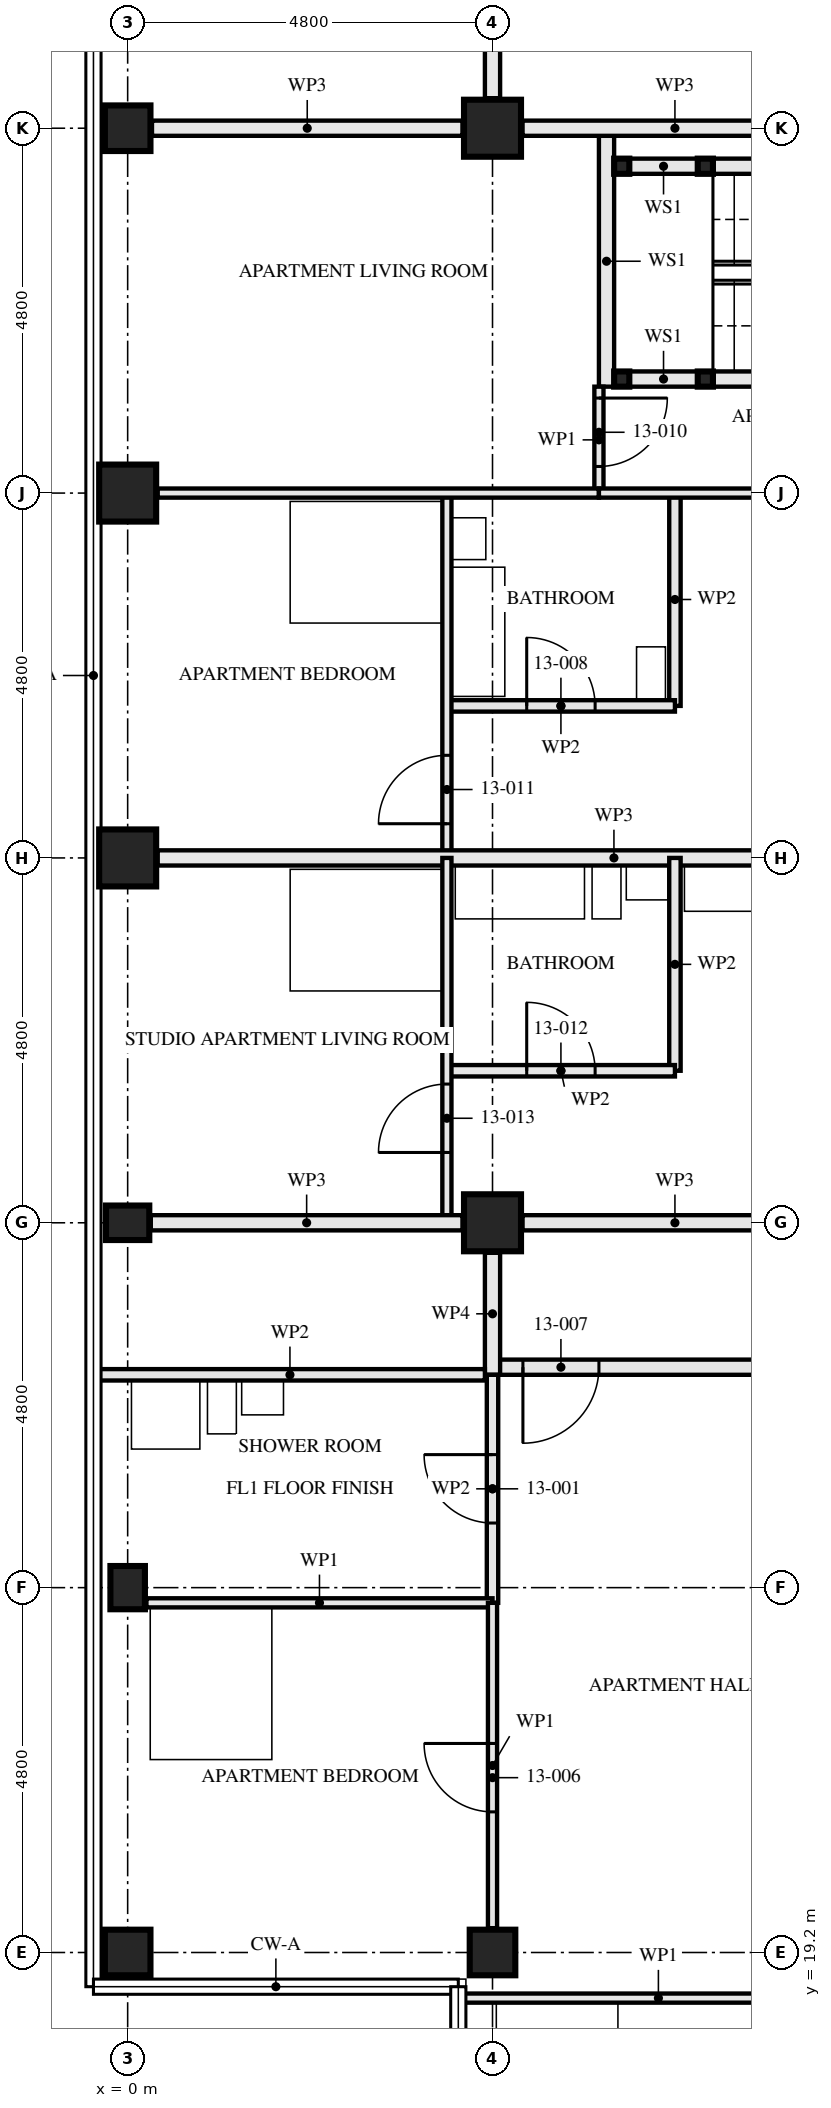
"""IFC4 building model, lengths in metres.
Left out: names, types, materials, properties, quantities, classifications, styles, units other than length and angle.
Written with IfcOpenShell. Run it as: python <this file> out.ifc"""

import sys

from ifc_helpers import new_model, si_unit, direction, frame, frame_2d, origin, origin_2d, place, context, subcontext, project, spatial, rectangle, hollow_rectangle, i_section, extrude, element, fill, save


model = new_model("IFC4")
c1 = context("Model", 3, precision=1e-05, world=origin(), true_north=direction((0.0, 1.0)))
c2 = subcontext(c1, "Body", "Model", "MODEL_VIEW")
j1 = project(units=[si_unit("LENGTHUNIT", "METRE"), si_unit("PLANEANGLEUNIT", "RADIAN")], contexts=[c1])
p1 = place(None, origin())
s1 = spatial("IfcSite", under=j1, at=p1, CompositionType="ELEMENT")
p2 = place(p1, origin())
s2 = spatial("IfcBuilding", under=s1, at=p2, CompositionType="ELEMENT")
p3 = place(p2, frame((0.0, 0.0, 51.5)))
s3 = spatial("IfcBuildingStorey", under=s2, at=p3, CompositionType="ELEMENT", Elevation=51.5)
p4 = place(p3, frame((0.0, 19.2, 0.0), z_axis=(0.0, 0.0, 1.0), x_axis=(0.0, 1.0, 0.0)))
e1 = element("IfcColumn", 1, at=p4, inside=s3, PredefinedType="COLUMN", context=c2, shape_type="SweptSolid", body=[
    extrude(hollow_rectangle(XDim=0.6, YDim=0.6, WallThickness=0.05, at=origin_2d()), origin(), (0.0, 0.0, 1.0), 3.5),
])
for number, where, z_axis, x_axis in (
    (2, (0.0, 24.0, 0.0), (0.0, 0.0, 1.0), (1.0, 0.0, 0.0)),
    (3, (0.0, 28.8, 0.0), (0.0, 0.0, 1.0), (0.0, 1.0, 0.0)),
):
    element("IfcColumn", number, at=place(p3, frame(where, z_axis=z_axis, x_axis=x_axis)), inside=s3, PredefinedType="COLUMN", context=c2, shape_type="SweptSolid", body=[
        extrude(i_section(OverallWidth=0.454, OverallDepth=0.569, WebThickness=0.078, FlangeThickness=0.125, FilletRadius=0.015, at=origin_2d()), origin(), (0.0, 0.0, 1.0), 3.5),
    ])
for number, where, z_axis, x_axis in (
    (4, (0.0, 33.6, 0.0), (0.0, 0.0, 1.0), (1.0, 0.0, 0.0)),
    (5, (0.0, 38.4, 0.0), (0.0, 0.0, 1.0), (1.0, 0.0, 0.0)),
):
    element("IfcColumn", number, at=place(p3, frame(where, z_axis=z_axis, x_axis=x_axis)), inside=s3, PredefinedType="COLUMN", context=c2, shape_type="SweptSolid", body=[
        extrude(hollow_rectangle(XDim=0.75, YDim=0.75, WallThickness=0.08, at=origin_2d()), origin(), (0.0, 0.0, 1.0), 3.5),
    ])
p5 = place(p3, frame((0.0, 43.2, 0.0), z_axis=(0.0, 0.0, 1.0), x_axis=(0.0, 1.0, 0.0)))
e6 = element("IfcColumn", 6, at=p5, inside=s3, PredefinedType="COLUMN", context=c2, shape_type="SweptSolid", body=[
    extrude(hollow_rectangle(XDim=0.6, YDim=0.6, WallThickness=0.08, at=origin_2d()), origin(), (0.0, 0.0, 1.0), 3.5),
])
p6 = place(p3, frame((4.8, 19.2, 0.0), z_axis=(0.0, 0.0, 1.0), x_axis=(0.0, 1.0, 0.0)))
e7 = element("IfcColumn", 7, at=p6, inside=s3, PredefinedType="COLUMN", context=c2, shape_type="SweptSolid", body=[
    extrude(hollow_rectangle(XDim=0.6, YDim=0.6, WallThickness=0.05, at=origin_2d()), origin(), (0.0, 0.0, 1.0), 3.5),
])
for number, where, z_axis, x_axis in (
    (8, (4.8, 28.8, 0.0), (0.0, 0.0, 1.0), (0.0, 1.0, 0.0)),
    (9, (4.8, 43.2, 0.0), (0.0, 0.0, 1.0), (0.0, 1.0, 0.0)),
):
    element("IfcColumn", number, at=place(p3, frame(where, z_axis=z_axis, x_axis=x_axis)), inside=s3, PredefinedType="COLUMN", context=c2, shape_type="SweptSolid", body=[
        extrude(hollow_rectangle(XDim=0.75, YDim=0.75, WallThickness=0.08, at=origin_2d()), origin(), (0.0, 0.0, 1.0), 3.5),
    ])
for number, where, z_axis, x_axis in (
    (10, (6.5, 42.7, 0.0), (0.0, 0.0, 1.0), (1.0, 0.0, 0.0)),
    (11, (6.5, 39.9, 0.0), (0.0, 0.0, 1.0), (1.0, 0.0, 0.0)),
    (12, (7.6, 42.7, 0.0), (0.0, 0.0, 1.0), (1.0, 0.0, 0.0)),
    (13, (7.6, 39.9, 0.0), (0.0, 0.0, 1.0), (1.0, 0.0, 0.0)),
):
    element("IfcColumn", number, at=place(p3, frame(where, z_axis=z_axis, x_axis=x_axis)), inside=s3, PredefinedType="COLUMN", context=c2, shape_type="SweptSolid", body=[
        extrude(hollow_rectangle(XDim=0.2, YDim=0.2, WallThickness=0.008, at=origin_2d()), origin(), (0.0, 0.0, 1.0), 3.33),
    ])
p7 = place(p3, frame((4.8, 23.8, 0.0), z_axis=(0.0, 0.0, 1.0), x_axis=(0.0, 1.0, 0.0)))
e14 = element("IfcWall", 14, at=p7, inside=s3, PredefinedType="PARTITIONING", context=c2, shape_type="SweptSolid", body=[
    extrude(rectangle(XDim=3.0, YDim=0.15, at=frame_2d((1.5, 0.0))), origin(), (0.0, 0.0, 1.0), 2.55),
])
p8 = place(p7, frame((1.05, 0.0, 0.0)))
e15 = element("IfcOpeningElement", 15, at=p8, cuts=e14, PredefinedType="OPENING", context=c2, shape_type="SweptSolid", body=[
    extrude(rectangle(XDim=0.9, YDim=2.1, at=frame_2d((0.45, 1.05))), frame((0.0, 0.085, 0.0), z_axis=(0.0, -1.0, 0.0), x_axis=(1.0, 0.0, 0.0)), (0.0, 0.0, 1.0), 0.171),
])
p9 = place(p3, frame((0.247, 23.8, 0.0), z_axis=(0.0, 0.0, 1.0), x_axis=(1.0, 0.0, 0.0)))
e16 = element("IfcWall", 16, at=p9, inside=s3, PredefinedType="PARTITIONING", context=c2, shape_type="SweptSolid", body=[
    extrude(rectangle(XDim=4.553, YDim=0.12, at=frame_2d((2.276, 0.0))), origin(), (0.0, 0.0, 1.0), 3.33),
])
p10 = place(p3, frame((4.365, 18.6, 0.0), z_axis=(0.0, 0.0, 1.0), x_axis=(1.0, 0.0, 0.0)))
e17 = element("IfcWall", 17, at=p10, inside=s3, PredefinedType="PARTITIONING", context=c2, shape_type="SweptSolid", body=[
    extrude(rectangle(XDim=5.235, YDim=0.12, at=frame_2d((2.618, 0.0))), origin(), (0.0, 0.0, 1.0), 2.32),
])
p11 = place(p10, frame((3.885, 0.0, 0.0)))
e18 = element("IfcOpeningElement", 18, at=p11, cuts=e17, PredefinedType="OPENING", context=c2, shape_type="SweptSolid", body=[
    extrude(rectangle(XDim=0.9, YDim=2.1, at=frame_2d((0.45, 1.05))), frame((0.0, 0.071, 0.0), z_axis=(0.0, -1.0, 0.0), x_axis=(1.0, 0.0, 0.0)), (0.0, 0.0, 1.0), 0.141),
])
p12 = place(p3, frame((4.8, 19.52, 0.0), z_axis=(0.0, 0.0, 1.0), x_axis=(0.0, 1.0, 0.0)))
e19 = element("IfcWall", 19, at=p12, inside=s3, PredefinedType="PARTITIONING", context=c2, shape_type="SweptSolid", body=[
    extrude(rectangle(XDim=4.28, YDim=0.12, at=frame_2d((2.14, 0.0))), origin(), (0.0, 0.0, 1.0), 3.33),
])
p13 = place(p12, frame((1.53, 0.0, 0.0)))
e20 = element("IfcOpeningElement", 20, at=p13, cuts=e19, PredefinedType="OPENING", context=c2, shape_type="SweptSolid", body=[
    extrude(rectangle(XDim=0.9, YDim=2.1, at=frame_2d((0.45, 1.05))), frame((0.0, 0.071, 0.0), z_axis=(0.0, -1.0, 0.0), x_axis=(1.0, 0.0, 0.0)), (0.0, 0.0, 1.0), 0.141),
])
p14 = place(p3, frame((4.8, 26.9, 0.0), z_axis=(0.0, 0.0, 1.0), x_axis=(1.0, 0.0, 0.0)))
e21 = element("IfcWall", 21, at=p14, inside=s3, PredefinedType="PARTITIONING", context=c2, shape_type="SweptSolid", body=[
    extrude(rectangle(XDim=9.6, YDim=0.2, at=frame_2d((4.8, 0.0))), origin(), (0.0, 0.0, 1.0), 3.33),
])
p15 = place(p14, frame((0.4, 0.0, 0.0)))
e22 = element("IfcOpeningElement", 22, at=p15, cuts=e21, PredefinedType="OPENING", context=c2, shape_type="SweptSolid", body=[
    extrude(rectangle(XDim=1.0, YDim=2.1, at=frame_2d((0.5, 1.05))), frame((0.0, 0.111, 0.0), z_axis=(0.0, -1.0, 0.0), x_axis=(1.0, 0.0, 0.0)), (0.0, 0.0, 1.0), 0.221),
])
p16 = place(p3, frame((4.8, 26.8, 0.0), z_axis=(0.0, 0.0, 1.0), x_axis=(0.0, 1.0, 0.0)))
e23 = element("IfcWall", 23, at=p16, inside=s3, PredefinedType="PARTITIONING", context=c2, shape_type="SweptSolid", body=[
    extrude(rectangle(XDim=1.605, YDim=0.2, at=frame_2d((0.802, 0.0))), origin(), (0.0, 0.0, 1.0), 3.33),
])
p17 = place(p3, frame((6.6, 42.7, 0.0), z_axis=(0.0, 0.0, 1.0), x_axis=(1.0, 0.0, 0.0)))
e24 = element("IfcWall", 24, at=p17, inside=s3, PredefinedType="SOLIDWALL", context=c2, shape_type="SweptSolid", body=[
    extrude(rectangle(XDim=0.9, YDim=0.2, at=frame_2d((0.45, 0.0))), origin(), (0.0, 0.0, 1.0), 2.99),
])
p18 = place(p3, frame((7.7, 42.7, 0.0), z_axis=(0.0, 0.0, 1.0), x_axis=(1.0, 0.0, 0.0)))
e25 = element("IfcWall", 25, at=p18, inside=s3, PredefinedType="SOLIDWALL", context=c2, shape_type="SweptSolid", body=[
    extrude(rectangle(XDim=4.7, YDim=0.2, at=frame_2d((2.35, 0.0))), origin(), (0.0, 0.0, 1.0), 2.99),
])
p19 = place(p3, frame((6.6, 39.9, 0.0), z_axis=(0.0, 0.0, 1.0), x_axis=(1.0, 0.0, 0.0)))
e26 = element("IfcWall", 26, at=p19, inside=s3, PredefinedType="SOLIDWALL", context=c2, shape_type="SweptSolid", body=[
    extrude(rectangle(XDim=0.9, YDim=0.2, at=frame_2d((0.45, 0.0))), origin(), (0.0, 0.0, 1.0), 2.99),
])
p20 = place(p3, frame((7.7, 39.9, 0.0), z_axis=(0.0, 0.0, 1.0), x_axis=(1.0, 0.0, 0.0)))
e27 = element("IfcWall", 27, at=p20, inside=s3, PredefinedType="SOLIDWALL", context=c2, shape_type="SweptSolid", body=[
    extrude(rectangle(XDim=4.7, YDim=0.2, at=frame_2d((2.35, 0.0))), origin(), (0.0, 0.0, 1.0), 2.99),
])
p21 = place(p3, frame((6.3, 43.1, 0.0), z_axis=(0.0, 0.0, 1.0), x_axis=(0.0, -1.0, 0.0)))
e28 = element("IfcWall", 28, at=p21, inside=s3, PredefinedType="SOLIDWALL", context=c2, shape_type="SweptSolid", body=[
    extrude(rectangle(XDim=3.3, YDim=0.2, at=frame_2d((1.65, 0.0))), origin(), (0.0, 0.0, 1.0), 3.33),
])
p22 = place(p3, frame((4.2, 35.6, 0.0), z_axis=(0.0, 0.0, 1.0), x_axis=(1.0, 0.0, 0.0)))
e29 = element("IfcWall", 29, at=p22, inside=s3, PredefinedType="PARTITIONING", context=c2, shape_type="SweptSolid", body=[
    extrude(rectangle(XDim=3.0, YDim=0.15, at=frame_2d((1.5, 0.0))), origin(), (0.0, 0.0, 1.0), 3.33),
])
p23 = place(p22, frame((1.05, 0.0, 0.0)))
e30 = element("IfcOpeningElement", 30, at=p23, cuts=e29, PredefinedType="OPENING", context=c2, shape_type="SweptSolid", body=[
    extrude(rectangle(XDim=0.9, YDim=2.1, at=frame_2d((0.45, 1.05))), frame((0.0, 0.085, 0.0), z_axis=(0.0, -1.0, 0.0), x_axis=(1.0, 0.0, 0.0)), (0.0, 0.0, 1.0), 0.171),
])
p24 = place(p3, frame((7.2, 38.4, 0.0), z_axis=(0.0, 0.0, 1.0), x_axis=(0.0, -1.0, 0.0)))
e31 = element("IfcWall", 31, at=p24, inside=s3, PredefinedType="PARTITIONING", context=c2, shape_type="SweptSolid", body=[
    extrude(rectangle(XDim=2.8, YDim=0.15, at=frame_2d((1.4, 0.0))), origin(), (0.0, 0.0, 1.0), 3.33),
])
p25 = place(p3, frame((6.2, 38.4, 0.0), z_axis=(0.0, 0.0, 1.0), x_axis=(1.0, 0.0, 0.0)))
e32 = element("IfcWall", 32, at=p25, inside=s3, PredefinedType="PARTITIONING", context=c2, shape_type="SweptSolid", body=[
    extrude(rectangle(XDim=6.25, YDim=0.12, at=frame_2d((3.125, 0.0))), origin(), (0.0, 0.0, 1.0), 2.55),
])
p26 = place(p25, frame((3.15, 0.0, 0.0)))
e33 = element("IfcOpeningElement", 33, at=p26, cuts=e32, PredefinedType="OPENING", context=c2, shape_type="SweptSolid", body=[
    extrude(rectangle(XDim=0.9, YDim=2.1, at=frame_2d((0.45, 1.05))), frame((0.0, 0.071, 0.0), z_axis=(0.0, -1.0, 0.0), x_axis=(1.0, 0.0, 0.0)), (0.0, 0.0, 1.0), 0.141),
])
p27 = place(p3, frame((6.2, 39.8, 0.0), z_axis=(0.0, 0.0, 1.0), x_axis=(0.0, -1.0, 0.0)))
e34 = element("IfcWall", 34, at=p27, inside=s3, PredefinedType="PARTITIONING", context=c2, shape_type="SweptSolid", body=[
    extrude(rectangle(XDim=1.4, YDim=0.12, at=frame_2d((0.7, 0.0))), origin(), (0.0, 0.0, 1.0), 3.33),
])
p28 = place(p27, frame((0.15, 0.0, 0.0)))
e35 = element("IfcOpeningElement", 35, at=p28, cuts=e34, PredefinedType="OPENING", context=c2, shape_type="SweptSolid", body=[
    extrude(rectangle(XDim=0.9, YDim=2.1, at=frame_2d((0.45, 1.05))), frame((0.0, 0.071, 0.0), z_axis=(0.0, -1.0, 0.0), x_axis=(1.0, 0.0, 0.0)), (0.0, 0.0, 1.0), 0.141),
])
p29 = place(p3, frame((4.2, 38.4, 0.0), z_axis=(0.0, 0.0, 1.0), x_axis=(0.0, -1.0, 0.0)))
e36 = element("IfcWall", 36, at=p29, inside=s3, PredefinedType="PARTITIONING", context=c2, shape_type="SweptSolid", body=[
    extrude(rectangle(XDim=4.8, YDim=0.12, at=frame_2d((2.4, 0.0))), origin(), (0.0, 0.0, 1.0), 3.33),
])
p30 = place(p29, frame((3.45, 0.0, 0.0)))
e37 = element("IfcOpeningElement", 37, at=p30, cuts=e36, PredefinedType="OPENING", context=c2, shape_type="SweptSolid", body=[
    extrude(rectangle(XDim=0.9, YDim=2.1, at=frame_2d((0.45, 1.05))), frame((0.0, 0.071, 0.0), z_axis=(0.0, -1.0, 0.0), x_axis=(1.0, 0.0, 0.0)), (0.0, 0.0, 1.0), 0.141),
])
p31 = place(p3, frame((0.395, 38.4, 0.0), z_axis=(0.0, 0.0, 1.0), x_axis=(1.0, 0.0, 0.0)))
e38 = element("IfcWall", 38, at=p31, inside=s3, PredefinedType="PARTITIONING", context=c2, shape_type="SweptSolid", body=[
    extrude(rectangle(XDim=5.805, YDim=0.12, at=frame_2d((2.902, 0.0))), origin(), (0.0, 0.0, 1.0), 2.55),
])
p32 = place(p3, frame((0.395, 33.6, 0.0), z_axis=(0.0, 0.0, 1.0), x_axis=(1.0, 0.0, 0.0)))
e39 = element("IfcWall", 39, at=p32, inside=s3, PredefinedType="PARTITIONING", context=c2, shape_type="SweptSolid", body=[
    extrude(rectangle(XDim=12.005, YDim=0.2, at=frame_2d((6.002, 0.0))), origin(), (0.0, 0.0, 1.0), 2.55),
])
p33 = place(p3, frame((4.2, 30.8, 0.0), z_axis=(0.0, 0.0, 1.0), x_axis=(1.0, 0.0, 0.0)))
e40 = element("IfcWall", 40, at=p33, inside=s3, PredefinedType="PARTITIONING", context=c2, shape_type="SweptSolid", body=[
    extrude(rectangle(XDim=3.0, YDim=0.15, at=frame_2d((1.5, 0.0))), origin(), (0.0, 0.0, 1.0), 3.33),
])
p34 = place(p33, frame((1.05, 0.0, 0.0)))
e41 = element("IfcOpeningElement", 41, at=p34, cuts=e40, PredefinedType="OPENING", context=c2, shape_type="SweptSolid", body=[
    extrude(rectangle(XDim=0.9, YDim=2.1, at=frame_2d((0.45, 1.05))), frame((0.0, 0.085, 0.0), z_axis=(0.0, -1.0, 0.0), x_axis=(1.0, 0.0, 0.0)), (0.0, 0.0, 1.0), 0.171),
])
p35 = place(p3, frame((7.2, 33.6, 0.0), z_axis=(0.0, 0.0, 1.0), x_axis=(0.0, -1.0, 0.0)))
e42 = element("IfcWall", 42, at=p35, inside=s3, PredefinedType="PARTITIONING", context=c2, shape_type="SweptSolid", body=[
    extrude(rectangle(XDim=2.8, YDim=0.15, at=frame_2d((1.4, 0.0))), origin(), (0.0, 0.0, 1.0), 3.33),
])
p36 = place(p3, frame((4.2, 33.6, 0.0), z_axis=(0.0, 0.0, 1.0), x_axis=(0.0, -1.0, 0.0)))
e43 = element("IfcWall", 43, at=p36, inside=s3, PredefinedType="PARTITIONING", context=c2, shape_type="SweptSolid", body=[
    extrude(rectangle(XDim=4.8, YDim=0.12, at=frame_2d((2.4, 0.0))), origin(), (0.0, 0.0, 1.0), 3.33),
])
p37 = place(p36, frame((2.975, 0.0, 0.0)))
e44 = element("IfcOpeningElement", 44, at=p37, cuts=e43, PredefinedType="OPENING", context=c2, shape_type="SweptSolid", body=[
    extrude(rectangle(XDim=0.9, YDim=2.1, at=frame_2d((0.45, 1.05))), frame((0.0, 0.071, 0.0), z_axis=(0.0, -1.0, 0.0), x_axis=(1.0, 0.0, 0.0)), (0.0, 0.0, 1.0), 0.141),
])
p38 = place(p3, frame((4.8, 45.2, 0.0), z_axis=(0.0, 0.0, 1.0), x_axis=(0.0, -1.0, 0.0)))
e45 = element("IfcWall", 45, at=p38, inside=s3, PredefinedType="PARTITIONING", context=c2, shape_type="SweptSolid", body=[
    extrude(rectangle(XDim=1.605, YDim=0.2, at=frame_2d((0.802, 0.0))), origin(), (0.0, 0.0, 1.0), 3.33),
])
p39 = place(p3, frame((9.205, 28.8, 0.0), z_axis=(0.0, 0.0, 1.0), x_axis=(-1.0, 0.0, 0.0)))
e46 = element("IfcWall", 46, at=p39, inside=s3, PredefinedType="PARTITIONING", context=c2, shape_type="SweptSolid", body=[
    extrude(rectangle(XDim=4.01, YDim=0.2, at=frame_2d((2.005, 0.0))), origin(), (0.0, 0.0, 1.0), 2.32),
])
p40 = place(p3, frame((4.405, 28.8, 0.0), z_axis=(0.0, 0.0, 1.0), x_axis=(-1.0, 0.0, 0.0)))
e47 = element("IfcWall", 47, at=p40, inside=s3, PredefinedType="PARTITIONING", context=c2, shape_type="SweptSolid", body=[
    extrude(rectangle(XDim=4.101, YDim=0.2, at=frame_2d((2.05, 0.0))), origin(), (0.0, 0.0, 1.0), 2.32),
])
p41 = place(p3, frame((9.205, 43.2, 0.0), z_axis=(0.0, 0.0, 1.0), x_axis=(-1.0, 0.0, 0.0)))
e48 = element("IfcWall", 48, at=p41, inside=s3, PredefinedType="PARTITIONING", context=c2, shape_type="SweptSolid", body=[
    extrude(rectangle(XDim=4.01, YDim=0.2, at=frame_2d((2.005, 0.0))), origin(), (0.0, 0.0, 1.0), 2.32),
])
p42 = place(p3, frame((4.405, 43.2, 0.0), z_axis=(0.0, 0.0, 1.0), x_axis=(-1.0, 0.0, 0.0)))
e49 = element("IfcWall", 49, at=p42, inside=s3, PredefinedType="PARTITIONING", context=c2, shape_type="SweptSolid", body=[
    extrude(rectangle(XDim=4.085, YDim=0.2, at=frame_2d((2.042, 0.0))), origin(), (0.0, 0.0, 1.0), 2.32),
])
p43 = place(p3, frame((-0.43, 26.8, 0.0), z_axis=(0.0, 0.0, 1.0), x_axis=(1.0, 0.0, 0.0)))
e50 = element("IfcWall", 50, at=p43, inside=s3, PredefinedType="PARTITIONING", context=c2, shape_type="SweptSolid", body=[
    extrude(rectangle(XDim=5.13, YDim=0.15, at=frame_2d((2.565, 0.0))), origin(), (0.0, 0.0, 1.0), 2.32),
])
p44 = place(p8, origin())
e51 = element("IfcDoor", 51, at=p44, inside=s3, OperationType="SINGLE_SWING_LEFT", PredefinedType="DOOR", context=c2, shape_type="SweptSolid", body=[
    extrude(rectangle(XDim=0.9, YDim=2.1, at=frame_2d((0.45, 1.05))), frame((0.0, 0.022, 0.0), z_axis=(0.0, -1.0, 0.0), x_axis=(1.0, 0.0, 0.0)), (0.0, 0.0, 1.0), 0.044),
])
fill(e15, e51)
p45 = place(p13, origin())
e52 = element("IfcDoor", 52, at=p45, inside=s3, OperationType="SINGLE_SWING_LEFT", PredefinedType="DOOR", context=c2, shape_type="SweptSolid", body=[
    extrude(rectangle(XDim=0.9, YDim=2.1, at=frame_2d((0.45, 1.05))), frame((0.0, 0.022, 0.0), z_axis=(0.0, -1.0, 0.0), x_axis=(1.0, 0.0, 0.0)), (0.0, 0.0, 1.0), 0.044),
])
fill(e20, e52)
p46 = place(p15, frame((1.0, 0.0, 0.0), z_axis=(0.0, 0.0, 1.0), x_axis=(-1.0, 0.0, 0.0)))
e53 = element("IfcDoor", 53, at=p46, inside=s3, OperationType="SINGLE_SWING_LEFT", PredefinedType="DOOR", context=c2, shape_type="SweptSolid", body=[
    extrude(rectangle(XDim=1.0, YDim=2.1, at=frame_2d((0.5, 1.05))), frame((0.0, 0.027, 0.0), z_axis=(0.0, -1.0, 0.0), x_axis=(1.0, 0.0, 0.0)), (0.0, 0.0, 1.0), 0.054),
])
fill(e22, e53)
p47 = place(p23, origin())
e54 = element("IfcDoor", 54, at=p47, inside=s3, OperationType="SINGLE_SWING_RIGHT", PredefinedType="DOOR", context=c2, shape_type="SweptSolid", body=[
    extrude(rectangle(XDim=0.9, YDim=2.1, at=frame_2d((0.45, 1.05))), frame((0.0, 0.022, 0.0), z_axis=(0.0, -1.0, 0.0), x_axis=(1.0, 0.0, 0.0)), (0.0, 0.0, 1.0), 0.044),
])
fill(e30, e54)
p48 = place(p28, origin())
e55 = element("IfcDoor", 55, at=p48, inside=s3, OperationType="SINGLE_SWING_RIGHT", PredefinedType="DOOR", context=c2, shape_type="SweptSolid", body=[
    extrude(rectangle(XDim=0.9, YDim=2.1, at=frame_2d((0.45, 1.05))), frame((0.0, 0.022, 0.0), z_axis=(0.0, -1.0, 0.0), x_axis=(1.0, 0.0, 0.0)), (0.0, 0.0, 1.0), 0.044),
])
fill(e35, e55)
p49 = place(p30, frame((0.9, 0.0, 0.0), z_axis=(0.0, 0.0, 1.0), x_axis=(-1.0, 0.0, 0.0)))
e56 = element("IfcDoor", 56, at=p49, inside=s3, OperationType="SINGLE_SWING_RIGHT", PredefinedType="DOOR", context=c2, shape_type="SweptSolid", body=[
    extrude(rectangle(XDim=0.9, YDim=2.1, at=frame_2d((0.45, 1.05))), frame((0.0, 0.022, 0.0), z_axis=(0.0, -1.0, 0.0), x_axis=(1.0, 0.0, 0.0)), (0.0, 0.0, 1.0), 0.044),
])
fill(e37, e56)
p50 = place(p34, origin())
e57 = element("IfcDoor", 57, at=p50, inside=s3, OperationType="SINGLE_SWING_RIGHT", PredefinedType="DOOR", context=c2, shape_type="SweptSolid", body=[
    extrude(rectangle(XDim=0.9, YDim=2.1, at=frame_2d((0.45, 1.05))), frame((0.0, 0.022, 0.0), z_axis=(0.0, -1.0, 0.0), x_axis=(1.0, 0.0, 0.0)), (0.0, 0.0, 1.0), 0.044),
])
fill(e41, e57)
p51 = place(p37, frame((0.9, 0.0, 0.0), z_axis=(0.0, 0.0, 1.0), x_axis=(-1.0, 0.0, 0.0)))
e58 = element("IfcDoor", 58, at=p51, inside=s3, OperationType="SINGLE_SWING_RIGHT", PredefinedType="DOOR", context=c2, shape_type="SweptSolid", body=[
    extrude(rectangle(XDim=0.9, YDim=2.1, at=frame_2d((0.45, 1.05))), frame((0.0, 0.022, 0.0), z_axis=(0.0, -1.0, 0.0), x_axis=(1.0, 0.0, 0.0)), (0.0, 0.0, 1.0), 0.044),
])
fill(e44, e58)
save(model, sys.argv[1])
